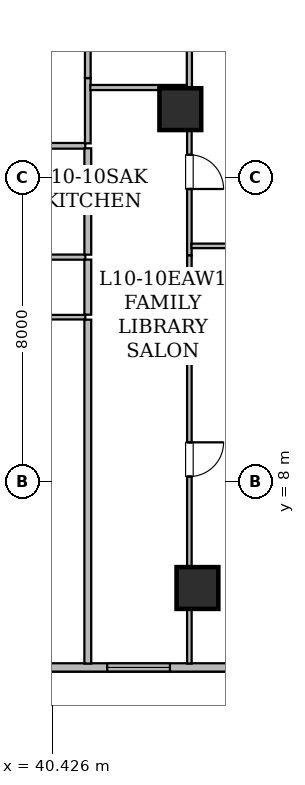
"""IFC4 building model, lengths in metres.
Left out: names, types, materials, properties, quantities, classifications, styles, units other than length and angle.
Written with IfcOpenShell. Run it as: python <this file> out.ifc"""

import sys

from ifc_helpers import new_model, si_unit, direction, frame, frame_2d, origin, origin_2d, place, context, subcontext, project, spatial, rectangle, hollow_rectangle, extrude, element, fill, save


model = new_model("IFC4")
c1 = context("Model", 3, precision=1e-05, world=origin(), true_north=direction((0.0, 1.0)))
c2 = subcontext(c1, "Body", "Model", "MODEL_VIEW")
j1 = project(units=[si_unit("LENGTHUNIT", "METRE"), si_unit("PLANEANGLEUNIT", "RADIAN")], contexts=[c1])
p1 = place(None, origin())
s1 = spatial("IfcSite", under=j1, at=p1, CompositionType="ELEMENT")
p2 = place(p1, origin())
s2 = spatial("IfcBuilding", under=s1, at=p2, CompositionType="ELEMENT")
p3 = place(p2, frame((0.0, 0.0, 44.25)))
s3 = spatial("IfcBuildingStorey", under=s2, at=p3, CompositionType="ELEMENT", Elevation=44.25)
for number, where, z_axis, x_axis in (
    (1, (44.25, 5.2, 0.0), (0.0, 0.0, 1.0), (1.0, 0.0, 0.0)),
    (2, (43.8, 17.8, 0.0), (0.0, 0.0, 1.0), (1.0, 0.0, 0.0)),
):
    element("IfcColumn", number, at=place(p3, frame(where, z_axis=z_axis, x_axis=x_axis)), inside=s3, PredefinedType="COLUMN", context=c2, shape_type="SweptSolid", body=[
        extrude(hollow_rectangle(XDim=1.1, YDim=1.1, WallThickness=0.055, at=origin_2d()), origin(), (0.0, 0.0, 1.0), 3.65),
    ])
p4 = place(p3, frame((45.683, 3.11, 0.0), z_axis=(0.0, 0.0, 1.0), x_axis=(-1.0, 0.0, 0.0)))
e3 = element("IfcWall", 3, at=p4, inside=s3, PredefinedType="STANDARD", context=c2, shape_type="SweptSolid", body=[
    extrude(rectangle(XDim=37.368, YDim=0.22, at=frame_2d((18.684, 0.0))), origin(), (0.0, 0.0, 1.0), 3.43),
])
p5 = place(p4, frame((14.508, 0.0, 0.85)))
e4 = element("IfcOpeningElement", 4, at=p5, cuts=e3, PredefinedType="OPENING", context=c2, shape_type="SweptSolid", body=[
    extrude(rectangle(XDim=1.65, YDim=1.55, at=frame_2d((0.825, 0.775))), frame((0.0, 0.12, 0.0), z_axis=(0.0, -1.0, 0.0), x_axis=(1.0, 0.0, 0.0)), (0.0, 0.0, 1.0), 0.24),
])
p6 = place(p4, frame((33.025, 0.0, 0.85)))
e5 = element("IfcOpeningElement", 5, at=p6, cuts=e3, PredefinedType="OPENING", context=c2, shape_type="SweptSolid", body=[
    extrude(rectangle(XDim=1.65, YDim=1.55, at=frame_2d((0.825, 0.775))), frame((0.0, 0.12, 0.0), z_axis=(0.0, -1.0, 0.0), x_axis=(1.0, 0.0, 0.0)), (0.0, 0.0, 1.0), 0.24),
])
p7 = place(p4, frame((24.713, 0.0, 0.8)))
e6 = element("IfcOpeningElement", 6, at=p7, cuts=e3, PredefinedType="OPENING", context=c2, shape_type="SweptSolid", body=[
    extrude(rectangle(XDim=1.2, YDim=1.5, at=frame_2d((0.6, 0.75))), frame((0.0, 0.12, 0.0), z_axis=(0.0, -1.0, 0.0), x_axis=(1.0, 0.0, 0.0)), (0.0, 0.0, 1.0), 0.24),
])
p8 = place(p4, frame((28.113, 0.0, 0.85)))
e7 = element("IfcOpeningElement", 7, at=p8, cuts=e3, PredefinedType="OPENING", context=c2, shape_type="SweptSolid", body=[
    extrude(rectangle(XDim=1.65, YDim=1.55, at=frame_2d((0.825, 0.775))), frame((0.0, 0.12, 0.0), z_axis=(0.0, -1.0, 0.0), x_axis=(1.0, 0.0, 0.0)), (0.0, 0.0, 1.0), 0.24),
])
p9 = place(p4, frame((20.863, 0.0, 0.85)))
e8 = element("IfcOpeningElement", 8, at=p9, cuts=e3, PredefinedType="OPENING", context=c2, shape_type="SweptSolid", body=[
    extrude(rectangle(XDim=1.65, YDim=1.55, at=frame_2d((0.825, 0.775))), frame((0.0, 0.12, 0.0), z_axis=(0.0, -1.0, 0.0), x_axis=(1.0, 0.0, 0.0)), (0.0, 0.0, 1.0), 0.24),
])
p10 = place(p4, frame((10.428, 0.0, 0.8)))
e9 = element("IfcOpeningElement", 9, at=p10, cuts=e3, PredefinedType="OPENING", context=c2, shape_type="SweptSolid", body=[
    extrude(rectangle(XDim=1.2, YDim=1.5, at=frame_2d((0.6, 0.75))), frame((0.0, 0.12, 0.0), z_axis=(0.0, -1.0, 0.0), x_axis=(1.0, 0.0, 0.0)), (0.0, 0.0, 1.0), 0.24),
])
p11 = place(p4, frame((6.453, 0.0, 0.85)))
e10 = element("IfcOpeningElement", 10, at=p11, cuts=e3, PredefinedType="OPENING", context=c2, shape_type="SweptSolid", body=[
    extrude(rectangle(XDim=1.65, YDim=1.55, at=frame_2d((0.825, 0.775))), frame((0.0, 0.12, 0.0), z_axis=(0.0, -1.0, 0.0), x_axis=(1.0, 0.0, 0.0)), (0.0, 0.0, 1.0), 0.24),
])
p12 = place(p4, frame((2.157, 0.0, 0.85)))
e11 = element("IfcOpeningElement", 11, at=p12, cuts=e3, PredefinedType="OPENING", context=c2, shape_type="SweptSolid", body=[
    extrude(rectangle(XDim=1.65, YDim=1.55, at=frame_2d((0.825, 0.775))), frame((0.0, 0.12, 0.0), z_axis=(0.0, -1.0, 0.0), x_axis=(1.0, 0.0, 0.0)), (0.0, 0.0, 1.0), 0.24),
])
p13 = place(p3, frame((41.3, 16.835, 0.0), z_axis=(0.0, 0.0, 1.0), x_axis=(-1.0, 0.0, 0.0)))
e12 = element("IfcWall", 12, at=p13, inside=s3, PredefinedType="STANDARD", context=c2, shape_type="SweptSolid", body=[
    extrude(rectangle(XDim=2.336, YDim=0.15, at=frame_2d((1.168, 0.0))), origin(), (0.0, 0.0, 1.0), 3.43),
])
p14 = place(p3, frame((41.365, 18.618, 0.0), z_axis=(0.0, 0.0, 1.0), x_axis=(0.0, -1.0, 0.0)))
e13 = element("IfcWall", 13, at=p14, inside=s3, PredefinedType="STANDARD", context=c2, shape_type="SweptSolid", body=[
    extrude(rectangle(XDim=1.718, YDim=0.15, at=frame_2d((0.859, 0.0))), origin(), (0.0, 0.0, 1.0), 2.647),
])
p15 = place(p3, frame((41.365, 22.085, 0.0), z_axis=(0.0, 0.0, 1.0), x_axis=(0.0, -1.0, 0.0)))
e14 = element("IfcWall", 14, at=p15, inside=s3, PredefinedType="STANDARD", context=c2, shape_type="SweptSolid", body=[
    extrude(rectangle(XDim=3.467, YDim=0.15, at=frame_2d((1.733, 0.0))), origin(), (0.0, 0.0, 1.0), 2.647),
])
p16 = place(p3, frame((38.65, 13.906, 0.0), z_axis=(0.0, 0.0, 1.0), x_axis=(1.0, 0.0, 0.0)))
e15 = element("IfcWall", 15, at=p16, inside=s3, PredefinedType="PARTITIONING", context=c2, shape_type="SweptSolid", body=[
    extrude(rectangle(XDim=2.65, YDim=0.135, at=frame_2d((1.325, 0.0))), origin(), (0.0, 0.0, 1.0), 3.43),
])
p17 = place(p3, frame((41.3, 12.326, 0.0), z_axis=(0.0, 0.0, 1.0), x_axis=(-1.0, 0.0, 0.0)))
e16 = element("IfcWall", 16, at=p17, inside=s3, PredefinedType="PARTITIONING", context=c2, shape_type="SweptSolid", body=[
    extrude(rectangle(XDim=5.92, YDim=0.12, at=frame_2d((2.96, 0.0))), origin(), (0.0, 0.0, 1.0), 3.43),
])
p18 = place(p3, frame((41.365, 13.841, 0.0), z_axis=(0.0, 0.0, 1.0), x_axis=(0.0, -1.0, 0.0)))
e17 = element("IfcWall", 17, at=p18, inside=s3, PredefinedType="STANDARD", context=c2, shape_type="SweptSolid", body=[
    extrude(rectangle(XDim=1.45, YDim=0.18, at=frame_2d((0.725, 0.0))), origin(), (0.0, 0.0, 1.0), 3.43),
])
p19 = place(p3, frame((41.365, 16.77, 0.0), z_axis=(0.0, 0.0, 1.0), x_axis=(0.0, -1.0, 0.0)))
e18 = element("IfcWall", 18, at=p19, inside=s3, PredefinedType="STANDARD", context=c2, shape_type="SweptSolid", body=[
    extrude(rectangle(XDim=2.799, YDim=0.18, at=frame_2d((1.399, 0.0))), origin(), (0.0, 0.0, 1.0), 3.43),
])
p20 = place(p3, frame((41.365, 12.261, 0.0), z_axis=(0.0, 0.0, 1.0), x_axis=(0.0, -1.0, 0.0)))
e19 = element("IfcWall", 19, at=p20, inside=s3, PredefinedType="STANDARD", context=c2, shape_type="SweptSolid", body=[
    extrude(rectangle(XDim=9.049, YDim=0.18, at=frame_2d((4.524, 0.0))), origin(), (0.0, 0.0, 1.0), 2.803),
])
p21 = place(p3, frame((44.038, 18.304, 0.0), z_axis=(0.0, 0.0, 1.0), x_axis=(0.0, -1.0, 0.0)))
e20 = element("IfcWall", 20, at=p21, inside=s3, PredefinedType="PARTITIONING", context=c2, shape_type="SweptSolid", body=[
    extrude(rectangle(XDim=4.351, YDim=0.12, at=frame_2d((2.176, 0.0))), origin(), (0.0, 0.0, 1.0), 2.647),
])
p22 = place(p21, frame((1.705, 0.0, 0.0)))
e21 = element("IfcOpeningElement", 21, at=p22, cuts=e20, PredefinedType="OPENING", context=c2, shape_type="SweptSolid", body=[
    extrude(rectangle(XDim=0.9, YDim=2.1, at=frame_2d((0.45, 1.05))), frame((0.0, 0.07, 0.0), z_axis=(0.0, -1.0, 0.0), x_axis=(1.0, 0.0, 0.0)), (0.0, 0.0, 1.0), 0.14),
])
p23 = place(p3, frame((44.038, 13.953, 0.0), z_axis=(0.0, 0.0, 1.0), x_axis=(0.0, -1.0, 0.0)))
e22 = element("IfcWall", 22, at=p23, inside=s3, PredefinedType="PARTITIONING", context=c2, shape_type="SweptSolid", body=[
    extrude(rectangle(XDim=10.741, YDim=0.12, at=frame_2d((5.371, 0.0))), origin(), (0.0, 0.0, 1.0), 2.647),
])
p24 = place(p23, frame((4.92, 0.0, 0.0)))
e23 = element("IfcOpeningElement", 23, at=p24, cuts=e22, PredefinedType="OPENING", context=c2, shape_type="SweptSolid", body=[
    extrude(rectangle(XDim=0.9, YDim=2.1, at=frame_2d((0.45, 1.05))), frame((0.0, 0.07, 0.0), z_axis=(0.0, -1.0, 0.0), x_axis=(1.0, 0.0, 0.0)), (0.0, 0.0, 1.0), 0.14),
])
p25 = place(p3, frame((41.432, 18.369, 0.0), z_axis=(0.0, 0.0, 1.0), x_axis=(1.0, 0.0, 0.0)))
e24 = element("IfcWall", 24, at=p25, inside=s3, PredefinedType="PARTITIONING", context=c2, shape_type="SweptSolid", body=[
    extrude(rectangle(XDim=2.541, YDim=0.135, at=frame_2d((1.271, 0.0))), origin(), (0.0, 0.0, 1.0), 2.647),
])
p26 = place(p3, frame((47.453, 14.202, 0.0), z_axis=(0.0, 0.0, 1.0), x_axis=(-1.0, 0.0, 0.0)))
e25 = element("IfcWall", 25, at=p26, inside=s3, PredefinedType="PARTITIONING", context=c2, shape_type="SweptSolid", body=[
    extrude(rectangle(XDim=3.361, YDim=0.12, at=frame_2d((1.68, 0.0))), origin(), (0.0, 0.0, 1.0), 2.647),
])
p27 = place(p26, frame((1.231, 0.0, 0.0)))
e26 = element("IfcOpeningElement", 26, at=p27, cuts=e25, PredefinedType="OPENING", context=c2, shape_type="SweptSolid", body=[
    extrude(rectangle(XDim=0.9, YDim=2.1, at=frame_2d((0.45, 1.05))), frame((0.0, 0.07, 0.0), z_axis=(0.0, -1.0, 0.0), x_axis=(1.0, 0.0, 0.0)), (0.0, 0.0, 1.0), 0.14),
])
p28 = place(p3, frame((44.038, 18.304, 0.0), z_axis=(0.0, 0.0, 1.0), x_axis=(0.0, 1.0, 0.0)))
e27 = element("IfcWall", 27, at=p28, inside=s3, PredefinedType="PARTITIONING", context=c2, shape_type="SweptSolid", body=[
    extrude(rectangle(XDim=4.095, YDim=0.135, at=frame_2d((2.047, 0.0))), origin(), (0.0, 0.0, 1.0), 2.647),
])
p29 = place(p28, frame((1.622, 0.0, 0.0)))
e28 = element("IfcOpeningElement", 28, at=p29, cuts=e27, PredefinedType="OPENING", context=c2, shape_type="SweptSolid", body=[
    extrude(rectangle(XDim=0.85, YDim=2.1, at=frame_2d((0.425, 1.05))), frame((0.0, 0.077, 0.0), z_axis=(0.0, -1.0, 0.0), x_axis=(1.0, 0.0, 0.0)), (0.0, 0.0, 1.0), 0.155),
])
p30 = place(p12, origin())
e29 = element("IfcWindow", 29, at=p30, inside=s3, PartitioningType="SINGLE_PANEL", PredefinedType="WINDOW", context=c2, shape_type="SweptSolid", body=[
    extrude(rectangle(XDim=1.65, YDim=1.55, at=frame_2d((0.825, 0.775))), frame((0.0, 0.03, 0.0), z_axis=(0.0, -1.0, 0.0), x_axis=(1.0, 0.0, 0.0)), (0.0, 0.0, 1.0), 0.06),
])
fill(e11, e29)
p31 = place(p22, origin())
e30 = element("IfcDoor", 30, at=p31, inside=s3, OperationType="SINGLE_SWING_RIGHT", PredefinedType="DOOR", context=c2, shape_type="SweptSolid", body=[
    extrude(rectangle(XDim=0.9, YDim=2.1, at=frame_2d((0.45, 1.05))), frame((0.0, 0.025, 0.0), z_axis=(0.0, -1.0, 0.0), x_axis=(1.0, 0.0, 0.0)), (0.0, 0.0, 1.0), 0.05),
])
fill(e21, e30)
p32 = place(p24, origin())
e31 = element("IfcDoor", 31, at=p32, inside=s3, OperationType="SINGLE_SWING_LEFT", PredefinedType="DOOR", context=c2, shape_type="SweptSolid", body=[
    extrude(rectangle(XDim=0.9, YDim=2.1, at=frame_2d((0.45, 1.05))), frame((0.0, 0.025, 0.0), z_axis=(0.0, -1.0, 0.0), x_axis=(1.0, 0.0, 0.0)), (0.0, 0.0, 1.0), 0.05),
])
fill(e23, e31)
save(model, sys.argv[1])
